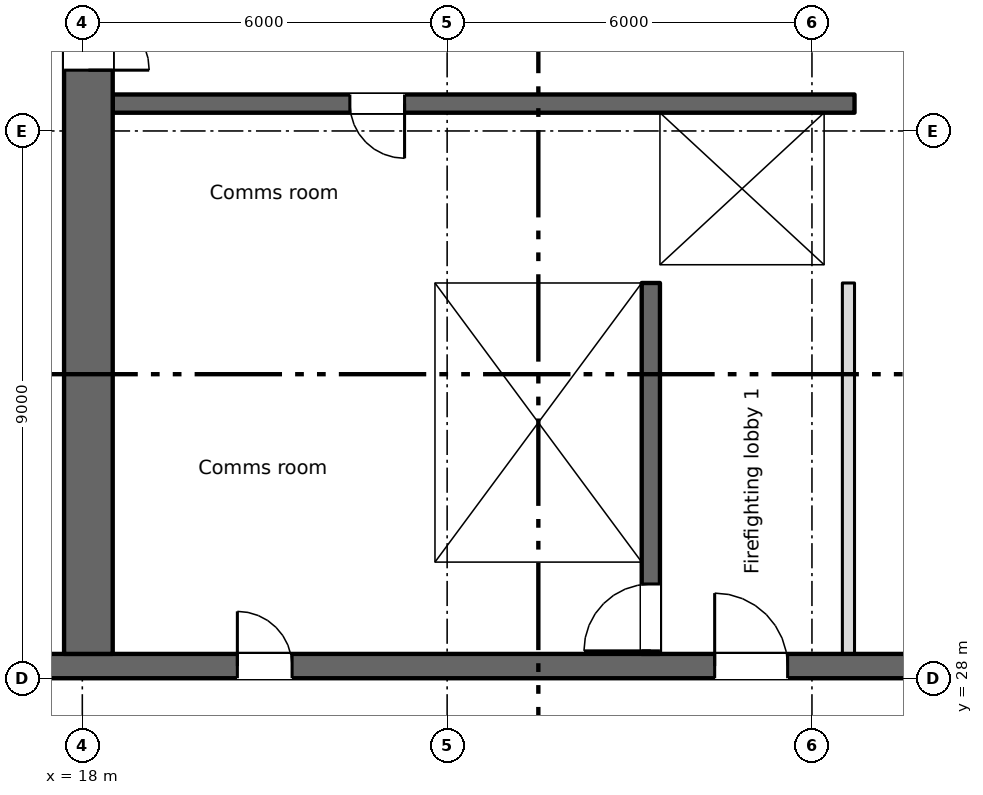
"""IFC4 building model, lengths in metres.
Left out: names, types, materials, properties, quantities, classifications, styles, units other than length and angle.
Written with IfcOpenShell. Run it as: python <this file> out.ifc"""

import sys

from ifc_helpers import new_model, si_unit, direction, frame, frame_2d, origin, place, context, subcontext, project, spatial, rectangle, extrude, element, fill, save


model = new_model("IFC4")
c1 = context("Model", 3, precision=1e-05, world=origin(), true_north=direction((0.0, 1.0)))
c2 = subcontext(c1, "Body", "Model", "MODEL_VIEW")
j1 = project(units=[si_unit("LENGTHUNIT", "METRE"), si_unit("PLANEANGLEUNIT", "RADIAN")], contexts=[c1])
p1 = place(None, origin())
s1 = spatial("IfcSite", under=j1, at=p1, CompositionType="ELEMENT")
p2 = place(p1, origin())
s2 = spatial("IfcBuilding", under=s1, at=p2, CompositionType="ELEMENT")
p3 = place(p2, frame((0.0, 0.0, 143.75)))
s3 = spatial("IfcBuildingStorey", under=s2, at=p3, CompositionType="ELEMENT", Elevation=143.75)
p4 = place(p3, frame((6.7, 28.2, 0.0), z_axis=(0.0, 0.0, 1.0), x_axis=(1.0, 0.0, 0.0)))
e1 = element("IfcWall", 1, at=p4, inside=s3, PredefinedType="SHEAR", context=c2, shape_type="SweptSolid", body=[
    extrude(rectangle(XDim=57.8, YDim=0.4, at=frame_2d((28.9, 0.0))), origin(), (0.0, 0.0, 1.0), 3.35),
])
p5 = place(p4, frame((13.85, 0.0, 0.0)))
e2 = element("IfcOpeningElement", 2, at=p5, cuts=e1, PredefinedType="OPENING", context=c2, shape_type="SweptSolid", body=[
    extrude(rectangle(XDim=0.9, YDim=2.1, at=frame_2d((0.45, 1.05))), frame((0.0, 0.21, 0.0), z_axis=(0.0, -1.0, 0.0), x_axis=(1.0, 0.0, 0.0)), (0.0, 0.0, 1.0), 0.42),
])
p6 = place(p4, frame((48.562, 0.0, 0.0)))
e3 = element("IfcOpeningElement", 3, at=p6, cuts=e1, PredefinedType="OPENING", context=c2, shape_type="SweptSolid", body=[
    extrude(rectangle(XDim=0.9, YDim=2.1, at=frame_2d((0.45, 1.05))), frame((0.0, 0.21, 0.0), z_axis=(0.0, -1.0, 0.0), x_axis=(1.0, 0.0, 0.0)), (0.0, 0.0, 1.0), 0.42),
])
p7 = place(p4, frame((51.137, 0.0, 0.0)))
e4 = element("IfcOpeningElement", 4, at=p7, cuts=e1, PredefinedType="OPENING", context=c2, shape_type="SweptSolid", body=[
    extrude(rectangle(XDim=0.9, YDim=2.1, at=frame_2d((0.45, 1.05))), frame((0.0, 0.21, 0.0), z_axis=(0.0, -1.0, 0.0), x_axis=(1.0, 0.0, 0.0)), (0.0, 0.0, 1.0), 0.42),
])
p8 = place(p4, frame((1.35, 0.0, 0.0)))
e5 = element("IfcOpeningElement", 5, at=p8, cuts=e1, PredefinedType="OPENING", context=c2, shape_type="SweptSolid", body=[
    extrude(rectangle(XDim=0.9, YDim=2.1, at=frame_2d((0.45, 1.05))), frame((0.0, 0.21, 0.0), z_axis=(0.0, -1.0, 0.0), x_axis=(1.0, 0.0, 0.0)), (0.0, 0.0, 1.0), 0.42),
])
p9 = place(p4, frame((4.7, 0.0, 0.0)))
e6 = element("IfcOpeningElement", 6, at=p9, cuts=e1, PredefinedType="OPENING", context=c2, shape_type="SweptSolid", body=[
    extrude(rectangle(XDim=1.2, YDim=2.1, at=frame_2d((0.6, 1.05))), frame((0.0, 0.21, 0.0), z_axis=(0.0, -1.0, 0.0), x_axis=(1.0, 0.0, 0.0)), (0.0, 0.0, 1.0), 0.42),
])
p10 = place(p4, frame((31.7, 0.0, 0.0)))
e7 = element("IfcOpeningElement", 7, at=p10, cuts=e1, PredefinedType="OPENING", context=c2, shape_type="SweptSolid", body=[
    extrude(rectangle(XDim=1.2, YDim=2.1, at=frame_2d((0.6, 1.05))), frame((0.0, 0.21, 0.0), z_axis=(0.0, -1.0, 0.0), x_axis=(1.0, 0.0, 0.0)), (0.0, 0.0, 1.0), 0.42),
])
p11 = place(p4, frame((55.2, 0.0, 0.0)))
e8 = element("IfcOpeningElement", 8, at=p11, cuts=e1, PredefinedType="OPENING", context=c2, shape_type="SweptSolid", body=[
    extrude(rectangle(XDim=1.2, YDim=2.1, at=frame_2d((0.6, 1.05))), frame((0.0, 0.21, 0.0), z_axis=(0.0, -1.0, 0.0), x_axis=(1.0, 0.0, 0.0)), (0.0, 0.0, 1.0), 0.42),
])
p12 = place(p4, frame((21.7, 0.0, 0.0)))
e9 = element("IfcOpeningElement", 9, at=p12, cuts=e1, PredefinedType="OPENING", context=c2, shape_type="SweptSolid", body=[
    extrude(rectangle(XDim=1.2, YDim=2.1, at=frame_2d((0.6, 1.05))), frame((0.0, 0.21, 0.0), z_axis=(0.0, -1.0, 0.0), x_axis=(1.0, 0.0, 0.0)), (0.0, 0.0, 1.0), 0.42),
])
p13 = place(p4, frame((41.7, 0.0, 0.0)))
e10 = element("IfcOpeningElement", 10, at=p13, cuts=e1, PredefinedType="OPENING", context=c2, shape_type="SweptSolid", body=[
    extrude(rectangle(XDim=1.2, YDim=2.1, at=frame_2d((0.6, 1.05))), frame((0.0, 0.21, 0.0), z_axis=(0.0, -1.0, 0.0), x_axis=(1.0, 0.0, 0.0)), (0.0, 0.0, 1.0), 0.42),
])
p14 = place(p4, frame((24.85, 0.0, 0.0)))
e11 = element("IfcOpeningElement", 11, at=p14, cuts=e1, PredefinedType="OPENING", context=c2, shape_type="SweptSolid", body=[
    extrude(rectangle(XDim=2.4, YDim=2.1, at=frame_2d((1.2, 1.05))), frame((0.0, 0.21, 0.0), z_axis=(0.0, -1.0, 0.0), x_axis=(1.0, 0.0, 0.0)), (0.0, 0.0, 1.0), 0.42),
])
p15 = place(p4, frame((37.35, 0.0, 0.0)))
e12 = element("IfcOpeningElement", 12, at=p15, cuts=e1, PredefinedType="OPENING", context=c2, shape_type="SweptSolid", body=[
    extrude(rectangle(XDim=2.4, YDim=2.1, at=frame_2d((1.2, 1.05))), frame((0.0, 0.21, 0.0), z_axis=(0.0, -1.0, 0.0), x_axis=(1.0, 0.0, 0.0)), (0.0, 0.0, 1.0), 0.42),
])
p16 = place(p4, frame((7.95, 0.0, 0.0)))
e13 = element("IfcOpeningElement", 13, at=p16, cuts=e1, PredefinedType="OPENING", context=c2, shape_type="SweptSolid", body=[
    extrude(rectangle(XDim=2.4, YDim=2.1, at=frame_2d((1.2, 1.05))), frame((0.0, 0.21, 0.0), z_axis=(0.0, -1.0, 0.0), x_axis=(1.0, 0.0, 0.0)), (0.0, 0.0, 1.0), 0.42),
])
p17 = place(p4, frame((28.85, 0.0, 0.0)))
e14 = element("IfcOpeningElement", 14, at=p17, cuts=e1, PredefinedType="OPENING", context=c2, shape_type="SweptSolid", body=[
    extrude(rectangle(XDim=0.9, YDim=2.1, at=frame_2d((0.45, 1.05))), frame((0.0, 0.21, 0.0), z_axis=(0.0, -1.0, 0.0), x_axis=(1.0, 0.0, 0.0)), (0.0, 0.0, 1.0), 0.42),
])
p18 = place(p4, frame((34.85, 0.0, 0.0)))
e15 = element("IfcOpeningElement", 15, at=p18, cuts=e1, PredefinedType="OPENING", context=c2, shape_type="SweptSolid", body=[
    extrude(rectangle(XDim=0.9, YDim=2.1, at=frame_2d((0.45, 1.05))), frame((0.0, 0.21, 0.0), z_axis=(0.0, -1.0, 0.0), x_axis=(1.0, 0.0, 0.0)), (0.0, 0.0, 1.0), 0.42),
])
p19 = place(p3, frame((18.1, 28.4, 0.0), z_axis=(0.0, 0.0, 1.0), x_axis=(0.0, 1.0, 0.0)))
e16 = element("IfcWall", 16, at=p19, inside=s3, PredefinedType="SHEAR", context=c2, shape_type="SweptSolid", body=[
    extrude(rectangle(XDim=16.8, YDim=0.8, at=frame_2d((8.4, 0.0))), origin(), (0.0, 0.0, 1.0), 3.35),
])
p20 = place(p19, frame((9.6, 0.0, 0.0)))
e17 = element("IfcOpeningElement", 17, at=p20, cuts=e16, PredefinedType="OPENING", context=c2, shape_type="SweptSolid", body=[
    extrude(rectangle(XDim=2.0, YDim=2.1, at=frame_2d((1.0, 1.05))), frame((0.0, 0.41, 0.0), z_axis=(0.0, -1.0, 0.0), x_axis=(1.0, 0.0, 0.0)), (0.0, 0.0, 1.0), 0.82),
])
p21 = place(p19, frame((15.35, 0.0, 0.0)))
e18 = element("IfcOpeningElement", 18, at=p21, cuts=e16, PredefinedType="OPENING", context=c2, shape_type="SweptSolid", body=[
    extrude(rectangle(XDim=1.2, YDim=2.1, at=frame_2d((0.6, 1.05))), frame((0.0, 0.41, 0.0), z_axis=(0.0, -1.0, 0.0), x_axis=(1.0, 0.0, 0.0)), (0.0, 0.0, 1.0), 0.82),
])
p22 = place(p3, frame((23.65, 28.4, 0.0), z_axis=(0.0, 0.0, 1.0), x_axis=(0.0, 1.0, 0.0)))
e19 = element("IfcWall", 19, at=p22, inside=s3, PredefinedType="SHEAR", context=c2, shape_type="SweptSolid", body=[
    extrude(rectangle(XDim=6.1, YDim=0.3, at=frame_2d((3.05, 0.0))), origin(), (0.0, 0.0, 1.0), 3.35),
])
p23 = place(p3, frame((27.35, 28.4, 0.0), z_axis=(0.0, 0.0, 1.0), x_axis=(0.0, 1.0, 0.0)))
e20 = element("IfcWall", 20, at=p23, inside=s3, PredefinedType="SHEAR", context=c2, shape_type="SweptSolid", body=[
    extrude(rectangle(XDim=6.1, YDim=0.3, at=frame_2d((3.05, 0.0))), origin(), (0.0, 0.0, 1.0), 3.35),
])
p24 = place(p23, frame((0.05, 0.0, 0.0)))
e21 = element("IfcOpeningElement", 21, at=p24, cuts=e20, PredefinedType="OPENING", context=c2, shape_type="SweptSolid", body=[
    extrude(rectangle(XDim=1.1, YDim=2.1, at=frame_2d((0.55, 1.05))), frame((0.0, 0.16, 0.0), z_axis=(0.0, -1.0, 0.0), x_axis=(1.0, 0.0, 0.0)), (0.0, 0.0, 1.0), 0.32),
])
p25 = place(p3, frame((18.5, 34.65, 0.0), z_axis=(0.0, 0.0, 1.0), x_axis=(1.0, 0.0, 0.0)))
e22 = element("IfcWall", 22, at=p25, inside=s3, PredefinedType="SHEAR", context=c2, shape_type="SweptSolid", body=[
    extrude(rectangle(XDim=12.2, YDim=0.3, at=frame_2d((6.1, 0.0))), origin(), (0.0, 0.0, 1.0), 3.35),
])
p26 = place(p25, frame((9.8, 0.0, 0.0)))
e23 = element("IfcOpeningElement", 23, at=p26, cuts=e22, PredefinedType="OPENING", context=c2, shape_type="SweptSolid", body=[
    extrude(rectangle(XDim=1.1, YDim=2.1, at=frame_2d((0.55, 1.05))), frame((0.0, 0.16, 0.0), z_axis=(0.0, -1.0, 0.0), x_axis=(1.0, 0.0, 0.0)), (0.0, 0.0, 1.0), 0.32),
])
p27 = place(p3, frame((30.7, 37.45, 0.0), z_axis=(0.0, 0.0, 1.0), x_axis=(-1.0, 0.0, 0.0)))
e24 = element("IfcWall", 24, at=p27, inside=s3, PredefinedType="SHEAR", context=c2, shape_type="SweptSolid", body=[
    extrude(rectangle(XDim=12.2, YDim=0.3, at=frame_2d((6.1, 0.0))), origin(), (0.0, 0.0, 1.0), 3.35),
])
p28 = place(p27, frame((7.4, 0.0, 0.0)))
e25 = element("IfcOpeningElement", 25, at=p28, cuts=e24, PredefinedType="OPENING", context=c2, shape_type="SweptSolid", body=[
    extrude(rectangle(XDim=0.9, YDim=2.1, at=frame_2d((0.45, 1.05))), frame((0.0, 0.16, 0.0), z_axis=(0.0, -1.0, 0.0), x_axis=(1.0, 0.0, 0.0)), (0.0, 0.0, 1.0), 0.32),
])
p29 = place(p3, frame((27.35, 34.8, 0.0), z_axis=(0.0, 0.0, 1.0), x_axis=(0.0, 1.0, 0.0)))
e26 = element("IfcWall", 26, at=p29, inside=s3, PredefinedType="SHEAR", context=c2, shape_type="SweptSolid", body=[
    extrude(rectangle(XDim=2.5, YDim=0.3, at=frame_2d((1.25, 0.0))), origin(), (0.0, 0.0, 1.0), 3.35),
])
p30 = place(p3, frame((30.45, 34.8, 0.0), z_axis=(0.0, 0.0, 1.0), x_axis=(0.0, 1.0, 0.0)))
e27 = element("IfcWall", 27, at=p30, inside=s3, PredefinedType="SHEAR", context=c2, shape_type="SweptSolid", body=[
    extrude(rectangle(XDim=2.5, YDim=0.5, at=frame_2d((1.25, 0.0))), origin(), (0.0, 0.0, 1.0), 3.35),
])
p31 = place(p3, frame((30.6, 28.4, 0.0), z_axis=(0.0, 0.0, 1.0), x_axis=(0.0, 1.0, 0.0)))
e28 = element("IfcWall", 28, at=p31, inside=s3, PredefinedType="PARTITIONING", context=c2, shape_type="SweptSolid", body=[
    extrude(rectangle(XDim=6.1, YDim=0.2, at=frame_2d((3.05, 0.0))), origin(), (0.0, 0.0, 1.0), 3.35),
])
p32 = place(p5, origin())
e29 = element("IfcDoor", 29, at=p32, inside=s3, OperationType="SINGLE_SWING_LEFT", PredefinedType="DOOR", context=c2, shape_type="SweptSolid", body=[
    extrude(rectangle(XDim=0.9, YDim=2.1, at=frame_2d((0.45, 1.05))), frame((0.0, 0.025, 0.0), z_axis=(0.0, -1.0, 0.0), x_axis=(1.0, 0.0, 0.0)), (0.0, 0.0, 1.0), 0.05),
])
fill(e2, e29)
p33 = place(p28, origin())
e30 = element("IfcDoor", 30, at=p33, inside=s3, OperationType="SINGLE_SWING_LEFT", PredefinedType="DOOR", context=c2, shape_type="SweptSolid", body=[
    extrude(rectangle(XDim=0.9, YDim=2.1, at=frame_2d((0.45, 1.05))), frame((0.0, 0.025, 0.0), z_axis=(0.0, -1.0, 0.0), x_axis=(1.0, 0.0, 0.0)), (0.0, 0.0, 1.0), 0.05),
])
fill(e25, e30)
p34 = place(p26, origin())
e31 = element("IfcDoor", 31, at=p34, inside=s3, OperationType="SLIDING_TO_LEFT", PredefinedType="DOOR", context=c2, shape_type="SweptSolid", body=[
    extrude(rectangle(XDim=1.1, YDim=2.1, at=frame_2d((0.55, 1.05))), frame((0.0, 0.025, 0.0), z_axis=(0.0, -1.0, 0.0), x_axis=(1.0, 0.0, 0.0)), (0.0, 0.0, 1.0), 0.05),
])
fill(e23, e31)
p35 = place(p24, origin())
e32 = element("IfcDoor", 32, at=p35, inside=s3, OperationType="SINGLE_SWING_LEFT", PredefinedType="DOOR", context=c2, shape_type="SweptSolid", body=[
    extrude(rectangle(XDim=1.1, YDim=2.1, at=frame_2d((0.55, 1.05))), frame((0.0, 0.025, 0.0), z_axis=(0.0, -1.0, 0.0), x_axis=(1.0, 0.0, 0.0)), (0.0, 0.0, 1.0), 0.05),
])
fill(e21, e32)
p36 = place(p12, origin())
e33 = element("IfcDoor", 33, at=p36, inside=s3, OperationType="SINGLE_SWING_LEFT", PredefinedType="DOOR", context=c2, shape_type="SweptSolid", body=[
    extrude(rectangle(XDim=1.2, YDim=2.1, at=frame_2d((0.6, 1.05))), frame((0.0, 0.025, 0.0), z_axis=(0.0, -1.0, 0.0), x_axis=(1.0, 0.0, 0.0)), (0.0, 0.0, 1.0), 0.05),
])
fill(e9, e33)
p37 = place(p20, origin())
e34 = element("IfcDoor", 34, at=p37, inside=s3, OperationType="DOUBLE_DOOR_SINGLE_SWING", PredefinedType="DOOR", context=c2, shape_type="SweptSolid", body=[
    extrude(rectangle(XDim=2.0, YDim=2.1, at=frame_2d((1.0, 1.05))), frame((0.0, 0.025, 0.0), z_axis=(0.0, -1.0, 0.0), x_axis=(1.0, 0.0, 0.0)), (0.0, 0.0, 1.0), 0.05),
])
fill(e17, e34)
save(model, sys.argv[1])
